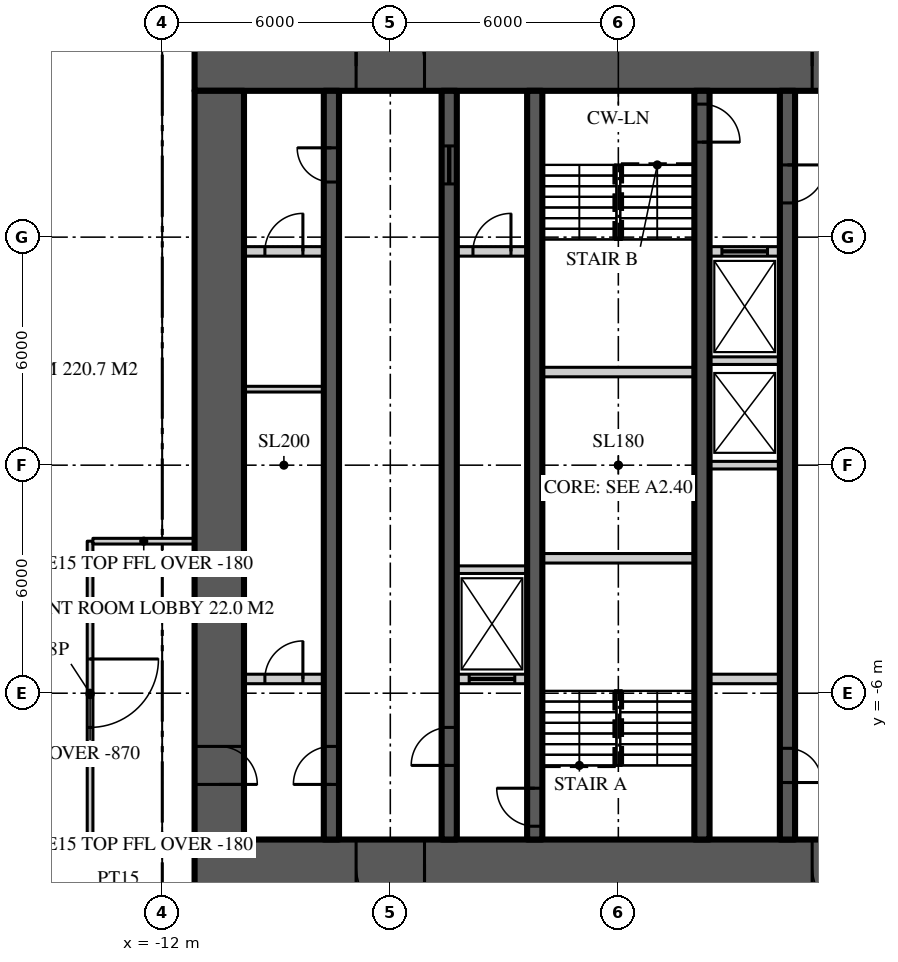
"""IFC4 building model, lengths in metres.
Left out: names, types, materials, properties, quantities, classifications, styles, units other than length and angle.
Written with IfcOpenShell. Run it as: python <this file> out.ifc"""

import sys

from ifc_helpers import new_model, si_unit, direction, frame, frame_2d, origin, place, context, subcontext, project, spatial, rectangle, extrude, element, fill, save


model = new_model("IFC4")
c1 = context("Model", 3, precision=1e-05, world=origin(), true_north=direction((0.0, 1.0)))
c2 = subcontext(c1, "Body", "Model", "MODEL_VIEW")
j1 = project(units=[si_unit("LENGTHUNIT", "METRE"), si_unit("PLANEANGLEUNIT", "RADIAN")], contexts=[c1])
p1 = place(None, origin())
s1 = spatial("IfcSite", under=j1, at=p1, CompositionType="ELEMENT")
p2 = place(p1, origin())
s2 = spatial("IfcBuilding", under=s1, at=p2, CompositionType="ELEMENT")
p3 = place(p2, frame((0.0, 0.0, 306.3)))
s3 = spatial("IfcBuildingStorey", under=s2, at=p3, CompositionType="ELEMENT", Elevation=306.3)
p4 = place(p3, frame((-11.15, 10.5, 0.0), z_axis=(0.0, 0.0, 1.0), x_axis=(1.0, 0.0, 0.0)))
e1 = element("IfcWall", 1, at=p4, inside=s3, PredefinedType="SHEAR", context=c2, shape_type="SweptSolid", body=[
    extrude(rectangle(XDim=22.3, YDim=1.3, at=frame_2d((11.15, 0.0))), origin(), (0.0, 0.0, 1.0), 5.0),
])
p5 = place(p4, frame((4.25, 0.0, 0.0)))
e2 = element("IfcOpeningElement", 2, at=p5, cuts=e1, PredefinedType="OPENING", context=c2, shape_type="SweptSolid", body=[
    extrude(rectangle(XDim=1.8, YDim=2.2, at=frame_2d((0.9, 1.1))), frame((0.0, 0.66, 0.0), z_axis=(0.0, -1.0, 0.0), x_axis=(1.0, 0.0, 0.0)), (0.0, 0.0, 1.0), 1.32),
])
p6 = place(p4, frame((16.25, 0.0, 0.0)))
e3 = element("IfcOpeningElement", 3, at=p6, cuts=e1, PredefinedType="OPENING", context=c2, shape_type="SweptSolid", body=[
    extrude(rectangle(XDim=1.8, YDim=2.2, at=frame_2d((0.9, 1.1))), frame((0.0, 0.66, 0.0), z_axis=(0.0, -1.0, 0.0), x_axis=(1.0, 0.0, 0.0)), (0.0, 0.0, 1.0), 1.32),
])
p7 = place(p3, frame((11.15, -10.5, 0.0), z_axis=(0.0, 0.0, 1.0), x_axis=(-1.0, 0.0, 0.0)))
e4 = element("IfcWall", 4, at=p7, inside=s3, PredefinedType="SHEAR", context=c2, shape_type="SweptSolid", body=[
    extrude(rectangle(XDim=22.3, YDim=1.3, at=frame_2d((11.15, 0.0))), origin(), (0.0, 0.0, 1.0), 5.0),
])
p8 = place(p7, frame((16.25, 0.0, 0.0)))
e5 = element("IfcOpeningElement", 5, at=p8, cuts=e4, PredefinedType="OPENING", context=c2, shape_type="SweptSolid", body=[
    extrude(rectangle(XDim=1.8, YDim=2.2, at=frame_2d((0.9, 1.1))), frame((0.0, 0.66, 0.0), z_axis=(0.0, -1.0, 0.0), x_axis=(1.0, 0.0, 0.0)), (0.0, 0.0, 1.0), 1.32),
])
p9 = place(p7, frame((4.25, 0.0, 0.0)))
e6 = element("IfcOpeningElement", 6, at=p9, cuts=e4, PredefinedType="OPENING", context=c2, shape_type="SweptSolid", body=[
    extrude(rectangle(XDim=1.8, YDim=2.2, at=frame_2d((0.9, 1.1))), frame((0.0, 0.66, 0.0), z_axis=(0.0, -1.0, 0.0), x_axis=(1.0, 0.0, 0.0)), (0.0, 0.0, 1.0), 1.32),
])
p10 = place(p3, frame((-10.5, 9.85, 0.0), z_axis=(0.0, 0.0, 1.0), x_axis=(0.0, -1.0, 0.0)))
e7 = element("IfcWall", 7, at=p10, inside=s3, PredefinedType="SHEAR", context=c2, shape_type="SweptSolid", body=[
    extrude(rectangle(XDim=19.7, YDim=1.3, at=frame_2d((9.85, 0.0))), origin(), (0.0, 0.0, 1.0), 5.0),
])
p11 = place(p10, frame((17.25, 0.0, 0.0)))
e8 = element("IfcOpeningElement", 8, at=p11, cuts=e7, PredefinedType="OPENING", context=c2, shape_type="SweptSolid", body=[
    extrude(rectangle(XDim=1.0, YDim=2.2, at=frame_2d((0.5, 1.1))), frame((0.0, 0.66, 0.0), z_axis=(0.0, -1.0, 0.0), x_axis=(1.0, 0.0, 0.0)), (0.0, 0.0, 1.0), 1.32),
])
p12 = place(p3, frame((-7.55, -9.85, 0.0), z_axis=(0.0, 0.0, 1.0), x_axis=(0.0, 1.0, 0.0)))
e9 = element("IfcWall", 9, at=p12, inside=s3, PredefinedType="SHEAR", context=c2, shape_type="SweptSolid", body=[
    extrude(rectangle(XDim=19.7, YDim=0.4, at=frame_2d((9.85, 0.0))), origin(), (0.0, 0.0, 1.0), 5.0),
])
p13 = place(p12, frame((1.45, 0.0, 0.0)))
e10 = element("IfcOpeningElement", 10, at=p13, cuts=e9, PredefinedType="OPENING", context=c2, shape_type="SweptSolid", body=[
    extrude(rectangle(XDim=1.0, YDim=2.2, at=frame_2d((0.5, 1.1))), frame((0.0, 0.21, 0.0), z_axis=(0.0, -1.0, 0.0), x_axis=(1.0, 0.0, 0.0)), (0.0, 0.0, 1.0), 0.42),
])
p14 = place(p12, frame((17.3, 0.0, 0.0)))
e11 = element("IfcOpeningElement", 11, at=p14, cuts=e9, PredefinedType="OPENING", context=c2, shape_type="SweptSolid", body=[
    extrude(rectangle(XDim=0.9, YDim=2.1, at=frame_2d((0.45, 1.05))), frame((0.0, 0.21, 0.0), z_axis=(0.0, -1.0, 0.0), x_axis=(1.0, 0.0, 0.0)), (0.0, 0.0, 1.0), 0.42),
])
p15 = place(p3, frame((-4.45, -9.85, 0.0), z_axis=(0.0, 0.0, 1.0), x_axis=(0.0, 1.0, 0.0)))
e12 = element("IfcWall", 12, at=p15, inside=s3, PredefinedType="SHEAR", context=c2, shape_type="SweptSolid", body=[
    extrude(rectangle(XDim=19.7, YDim=0.4, at=frame_2d((9.85, 0.0))), origin(), (0.0, 0.0, 1.0), 5.0),
])
p16 = place(p15, frame((1.95, 0.0, 0.0)))
e13 = element("IfcOpeningElement", 13, at=p16, cuts=e12, PredefinedType="OPENING", context=c2, shape_type="SweptSolid", body=[
    extrude(rectangle(XDim=1.0, YDim=2.2, at=frame_2d((0.5, 1.1))), frame((0.0, 0.21, 0.0), z_axis=(0.0, -1.0, 0.0), x_axis=(1.0, 0.0, 0.0)), (0.0, 0.0, 1.0), 0.42),
])
p17 = place(p15, frame((17.25, 0.0, 0.0)))
e14 = element("IfcOpeningElement", 14, at=p17, cuts=e12, PredefinedType="OPENING", context=c2, shape_type="SweptSolid", body=[
    extrude(rectangle(XDim=1.0, YDim=2.1, at=frame_2d((0.5, 1.05))), frame((0.0, 0.21, 0.0), z_axis=(0.0, -1.0, 0.0), x_axis=(1.0, 0.0, 0.0)), (0.0, 0.0, 1.0), 0.42),
])
p18 = place(p3, frame((4.45, 9.85, 0.0), z_axis=(0.0, 0.0, 1.0), x_axis=(0.0, -1.0, 0.0)))
e15 = element("IfcWall", 15, at=p18, inside=s3, PredefinedType="SHEAR", context=c2, shape_type="SweptSolid", body=[
    extrude(rectangle(XDim=19.7, YDim=0.4, at=frame_2d((9.85, 0.0))), origin(), (0.0, 0.0, 1.0), 5.0),
])
p19 = place(p18, frame((1.95, 0.0, 0.0)))
e16 = element("IfcOpeningElement", 16, at=p19, cuts=e15, PredefinedType="OPENING", context=c2, shape_type="SweptSolid", body=[
    extrude(rectangle(XDim=1.0, YDim=2.2, at=frame_2d((0.5, 1.1))), frame((0.0, 0.21, 0.0), z_axis=(0.0, -1.0, 0.0), x_axis=(1.0, 0.0, 0.0)), (0.0, 0.0, 1.0), 0.42),
])
p20 = place(p18, frame((17.3, 0.0, 0.0)))
e17 = element("IfcOpeningElement", 17, at=p20, cuts=e15, PredefinedType="OPENING", context=c2, shape_type="SweptSolid", body=[
    extrude(rectangle(XDim=0.9, YDim=2.1, at=frame_2d((0.45, 1.05))), frame((0.0, 0.21, 0.0), z_axis=(0.0, -1.0, 0.0), x_axis=(1.0, 0.0, 0.0)), (0.0, 0.0, 1.0), 0.42),
])
p21 = place(p3, frame((-2.2, -9.85, 0.0), z_axis=(0.0, 0.0, 1.0), x_axis=(0.0, 1.0, 0.0)))
e18 = element("IfcWall", 18, at=p21, inside=s3, PredefinedType="SHEAR", context=c2, shape_type="SweptSolid", body=[
    extrude(rectangle(XDim=19.7, YDim=0.4, at=frame_2d((9.85, 0.0))), origin(), (0.0, 0.0, 1.0), 5.0),
])
p22 = place(p21, frame((0.35, 0.0, 0.0)))
e19 = element("IfcOpeningElement", 19, at=p22, cuts=e18, PredefinedType="OPENING", context=c2, shape_type="SweptSolid", body=[
    extrude(rectangle(XDim=1.0, YDim=2.2, at=frame_2d((0.5, 1.1))), frame((0.0, 0.21, 0.0), z_axis=(0.0, -1.0, 0.0), x_axis=(1.0, 0.0, 0.0)), (0.0, 0.0, 1.0), 0.42),
])
p23 = place(p3, frame((2.2, 9.85, 0.0), z_axis=(0.0, 0.0, 1.0), x_axis=(0.0, -1.0, 0.0)))
e20 = element("IfcWall", 20, at=p23, inside=s3, PredefinedType="SHEAR", context=c2, shape_type="SweptSolid", body=[
    extrude(rectangle(XDim=19.7, YDim=0.4, at=frame_2d((9.85, 0.0))), origin(), (0.0, 0.0, 1.0), 5.0),
])
p24 = place(p23, frame((0.35, 0.0, 0.0)))
e21 = element("IfcOpeningElement", 21, at=p24, cuts=e20, PredefinedType="OPENING", context=c2, shape_type="SweptSolid", body=[
    extrude(rectangle(XDim=1.0, YDim=2.2, at=frame_2d((0.5, 1.1))), frame((0.0, 0.21, 0.0), z_axis=(0.0, -1.0, 0.0), x_axis=(1.0, 0.0, 0.0)), (0.0, 0.0, 1.0), 0.42),
])
p25 = place(p3, frame((-9.85, 5.625, 0.0), z_axis=(0.0, 0.0, 1.0), x_axis=(1.0, 0.0, 0.0)))
e22 = element("IfcWall", 22, at=p25, inside=s3, PredefinedType="SOLIDWALL", context=c2, shape_type="SweptSolid", body=[
    extrude(rectangle(XDim=2.1, YDim=0.25, at=frame_2d((1.05, 0.0))), origin(), (0.0, 0.0, 1.0), 4.8),
])
p26 = place(p25, frame((0.55, 0.0, 0.0)))
e23 = element("IfcOpeningElement", 23, at=p26, cuts=e22, PredefinedType="OPENING", context=c2, shape_type="SweptSolid", body=[
    extrude(rectangle(XDim=1.0, YDim=2.2, at=frame_2d((0.5, 1.1))), frame((0.0, 0.135, 0.0), z_axis=(0.0, -1.0, 0.0), x_axis=(1.0, 0.0, 0.0)), (0.0, 0.0, 1.0), 0.27),
])
p27 = place(p3, frame((-4.25, 5.625, 0.0), z_axis=(0.0, 0.0, 1.0), x_axis=(1.0, 0.0, 0.0)))
e24 = element("IfcWall", 24, at=p27, inside=s3, PredefinedType="SOLIDWALL", context=c2, shape_type="SweptSolid", body=[
    extrude(rectangle(XDim=1.85, YDim=0.25, at=frame_2d((0.925, 0.0))), origin(), (0.0, 0.0, 1.0), 4.8),
])
p28 = place(p27, frame((0.425, 0.0, 0.0)))
e25 = element("IfcOpeningElement", 25, at=p28, cuts=e24, PredefinedType="OPENING", context=c2, shape_type="SweptSolid", body=[
    extrude(rectangle(XDim=1.0, YDim=2.2, at=frame_2d((0.5, 1.1))), frame((0.0, 0.135, 0.0), z_axis=(0.0, -1.0, 0.0), x_axis=(1.0, 0.0, 0.0)), (0.0, 0.0, 1.0), 0.27),
])
p29 = place(p3, frame((2.4, 5.625, 0.0), z_axis=(0.0, 0.0, 1.0), x_axis=(1.0, 0.0, 0.0)))
e26 = element("IfcWall", 26, at=p29, inside=s3, PredefinedType="SOLIDWALL", context=c2, shape_type="SweptSolid", body=[
    extrude(rectangle(XDim=1.85, YDim=0.25, at=frame_2d((0.925, 0.0))), origin(), (0.0, 0.0, 1.0), 4.8),
])
p30 = place(p29, frame((0.325, 0.0, 0.0)))
e27 = element("IfcOpeningElement", 27, at=p30, cuts=e26, PredefinedType="OPENING", context=c2, shape_type="SweptSolid", body=[
    extrude(rectangle(XDim=1.2, YDim=2.2, at=frame_2d((0.6, 1.1))), frame((0.0, 0.135, 0.0), z_axis=(0.0, -1.0, 0.0), x_axis=(1.0, 0.0, 0.0)), (0.0, 0.0, 1.0), 0.27),
])
p31 = place(p3, frame((-9.85, -5.625, 0.0), z_axis=(0.0, 0.0, 1.0), x_axis=(1.0, 0.0, 0.0)))
e28 = element("IfcWall", 28, at=p31, inside=s3, PredefinedType="SOLIDWALL", context=c2, shape_type="SweptSolid", body=[
    extrude(rectangle(XDim=2.1, YDim=0.25, at=frame_2d((1.05, 0.0))), origin(), (0.0, 0.0, 1.0), 4.8),
])
p32 = place(p31, frame((0.55, 0.0, 0.0)))
e29 = element("IfcOpeningElement", 29, at=p32, cuts=e28, PredefinedType="OPENING", context=c2, shape_type="SweptSolid", body=[
    extrude(rectangle(XDim=1.0, YDim=2.2, at=frame_2d((0.5, 1.1))), frame((0.0, 0.135, 0.0), z_axis=(0.0, -1.0, 0.0), x_axis=(1.0, 0.0, 0.0)), (0.0, 0.0, 1.0), 0.27),
])
p33 = place(p3, frame((-4.25, -5.625, 0.0), z_axis=(0.0, 0.0, 1.0), x_axis=(1.0, 0.0, 0.0)))
e30 = element("IfcWall", 30, at=p33, inside=s3, PredefinedType="SOLIDWALL", context=c2, shape_type="SweptSolid", body=[
    extrude(rectangle(XDim=1.85, YDim=0.25, at=frame_2d((0.925, 0.0))), origin(), (0.0, 0.0, 1.0), 4.8),
])
p34 = place(p33, frame((0.325, 0.0, 0.0)))
e31 = element("IfcOpeningElement", 31, at=p34, cuts=e30, PredefinedType="OPENING", context=c2, shape_type="SweptSolid", body=[
    extrude(rectangle(XDim=1.2, YDim=2.2, at=frame_2d((0.6, 1.1))), frame((0.0, 0.135, 0.0), z_axis=(0.0, -1.0, 0.0), x_axis=(1.0, 0.0, 0.0)), (0.0, 0.0, 1.0), 0.27),
])
p35 = place(p3, frame((2.4, -5.625, 0.0), z_axis=(0.0, 0.0, 1.0), x_axis=(1.0, 0.0, 0.0)))
e32 = element("IfcWall", 32, at=p35, inside=s3, PredefinedType="SOLIDWALL", context=c2, shape_type="SweptSolid", body=[
    extrude(rectangle(XDim=1.85, YDim=0.25, at=frame_2d((0.925, 0.0))), origin(), (0.0, 0.0, 1.0), 4.8),
])
for number, where, z_axis, x_axis in (
    (33, (-2.0, -2.45, 0.0), (0.0, 0.0, 1.0), (1.0, 0.0, 0.0)),
    (34, (-2.0, 2.45, 0.0), (0.0, 0.0, 1.0), (1.0, 0.0, 0.0)),
):
    element("IfcWall", number, at=place(p3, frame(where, z_axis=z_axis, x_axis=x_axis)), inside=s3, PredefinedType="SOLIDWALL", context=c2, shape_type="SweptSolid", body=[
        extrude(rectangle(XDim=4.0, YDim=0.25, at=frame_2d((2.0, 0.0))), origin(), (0.0, 0.0, 1.0), 4.8),
    ])
for number, where, z_axis, x_axis in (
    (35, (-4.25, -2.75, 0.0), (0.0, 0.0, 1.0), (1.0, 0.0, 0.0)),
    (36, (2.4, 0.0, 0.0), (0.0, 0.0, 1.0), (1.0, 0.0, 0.0)),
    (37, (2.4, 2.75, 0.0), (0.0, 0.0, 1.0), (1.0, 0.0, 0.0)),
):
    element("IfcWall", number, at=place(p3, frame(where, z_axis=z_axis, x_axis=x_axis)), inside=s3, PredefinedType="SOLIDWALL", context=c2, shape_type="SweptSolid", body=[
        extrude(rectangle(XDim=1.85, YDim=0.2, at=frame_2d((0.925, 0.0))), origin(), (0.0, 0.0, 1.0), 4.8),
    ])
p36 = place(p3, frame((-13.9, -2.0, 0.0), z_axis=(0.0, 0.0, 1.0), x_axis=(0.0, -1.0, 0.0)))
e38 = element("IfcWall", 38, at=p36, inside=s3, PredefinedType="SOLIDWALL", context=c2, shape_type="SweptSolid", body=[
    extrude(rectangle(XDim=8.075, YDim=0.15, at=frame_2d((4.038, 0.0))), origin(), (0.0, 0.0, 1.0), 4.13),
])
p37 = place(p36, frame((3.1, 0.0, 0.0)))
e39 = element("IfcOpeningElement", 39, at=p37, cuts=e38, PredefinedType="OPENING", context=c2, shape_type="SweptSolid", body=[
    extrude(rectangle(XDim=1.8, YDim=2.4, at=frame_2d((0.9, 1.2))), frame((0.0, 0.085, 0.0), z_axis=(0.0, -1.0, 0.0), x_axis=(1.0, 0.0, 0.0)), (0.0, 0.0, 1.0), 0.17),
])
for number, where, z_axis, x_axis in (
    (40, (-11.15, -10.0, 0.0), (0.0, 0.0, 1.0), (-1.0, 0.0, 0.0)),
    (41, (-11.15, -2.0, 0.0), (0.0, 0.0, 1.0), (-1.0, 0.0, 0.0)),
):
    element("IfcWall", number, at=place(p3, frame(where, z_axis=z_axis, x_axis=x_axis)), inside=s3, PredefinedType="SOLIDWALL", context=c2, shape_type="SweptSolid", body=[
        extrude(rectangle(XDim=2.675, YDim=0.15, at=frame_2d((1.337, 0.0))), origin(), (0.0, 0.0, 1.0), 4.82),
    ])
p38 = place(p3, frame((-9.85, 2.0, 0.0), z_axis=(0.0, 0.0, 1.0), x_axis=(1.0, 0.0, 0.0)))
e42 = element("IfcWall", 42, at=p38, inside=s3, PredefinedType="SOLIDWALL", context=c2, shape_type="SweptSolid", body=[
    extrude(rectangle(XDim=2.1, YDim=0.15, at=frame_2d((1.05, 0.0))), origin(), (0.0, 0.0, 1.0), 4.82),
])
p39 = place(p5, origin())
e43 = element("IfcDoor", 43, at=p39, inside=s3, OperationType="DOUBLE_DOOR_DOUBLE_SWING", PredefinedType="DOOR", context=c2, shape_type="SweptSolid", body=[
    extrude(rectangle(XDim=1.8, YDim=2.2, at=frame_2d((0.9, 1.1))), frame((0.0, 0.025, 0.0), z_axis=(0.0, -1.0, 0.0), x_axis=(1.0, 0.0, 0.0)), (0.0, 0.0, 1.0), 0.05),
])
fill(e2, e43)
p40 = place(p8, origin())
e44 = element("IfcDoor", 44, at=p40, inside=s3, OperationType="DOUBLE_DOOR_DOUBLE_SWING", PredefinedType="DOOR", context=c2, shape_type="SweptSolid", body=[
    extrude(rectangle(XDim=1.8, YDim=2.2, at=frame_2d((0.9, 1.1))), frame((0.0, 0.025, 0.0), z_axis=(0.0, -1.0, 0.0), x_axis=(1.0, 0.0, 0.0)), (0.0, 0.0, 1.0), 0.05),
])
fill(e5, e44)
p41 = place(p6, origin())
e45 = element("IfcDoor", 45, at=p41, inside=s3, OperationType="DOUBLE_DOOR_DOUBLE_SWING", PredefinedType="DOOR", context=c2, shape_type="SweptSolid", body=[
    extrude(rectangle(XDim=1.8, YDim=2.2, at=frame_2d((0.9, 1.1))), frame((0.0, 0.025, 0.0), z_axis=(0.0, -1.0, 0.0), x_axis=(1.0, 0.0, 0.0)), (0.0, 0.0, 1.0), 0.05),
])
fill(e3, e45)
p42 = place(p9, origin())
e46 = element("IfcDoor", 46, at=p42, inside=s3, OperationType="DOUBLE_DOOR_DOUBLE_SWING", PredefinedType="DOOR", context=c2, shape_type="SweptSolid", body=[
    extrude(rectangle(XDim=1.8, YDim=2.2, at=frame_2d((0.9, 1.1))), frame((0.0, 0.025, 0.0), z_axis=(0.0, -1.0, 0.0), x_axis=(1.0, 0.0, 0.0)), (0.0, 0.0, 1.0), 0.05),
])
fill(e6, e46)
p43 = place(p13, origin())
e47 = element("IfcDoor", 47, at=p43, inside=s3, OperationType="SINGLE_SWING_LEFT", PredefinedType="DOOR", context=c2, shape_type="SweptSolid", body=[
    extrude(rectangle(XDim=1.0, YDim=2.2, at=frame_2d((0.5, 1.1))), frame((0.0, 0.025, 0.0), z_axis=(0.0, -1.0, 0.0), x_axis=(1.0, 0.0, 0.0)), (0.0, 0.0, 1.0), 0.05),
])
fill(e10, e47)
p44 = place(p11, origin())
e48 = element("IfcDoor", 48, at=p44, inside=s3, OperationType="SINGLE_SWING_RIGHT", PredefinedType="DOOR", context=c2, shape_type="SweptSolid", body=[
    extrude(rectangle(XDim=1.0, YDim=2.2, at=frame_2d((0.5, 1.1))), frame((0.0, 0.025, 0.0), z_axis=(0.0, -1.0, 0.0), x_axis=(1.0, 0.0, 0.0)), (0.0, 0.0, 1.0), 0.05),
])
fill(e8, e48)
p45 = place(p16, origin())
e49 = element("IfcDoor", 49, at=p45, inside=s3, OperationType="SINGLE_SWING_LEFT", PredefinedType="DOOR", context=c2, shape_type="SweptSolid", body=[
    extrude(rectangle(XDim=1.0, YDim=2.2, at=frame_2d((0.5, 1.1))), frame((0.0, 0.025, 0.0), z_axis=(0.0, -1.0, 0.0), x_axis=(1.0, 0.0, 0.0)), (0.0, 0.0, 1.0), 0.05),
])
fill(e13, e49)
p46 = place(p22, origin())
e50 = element("IfcDoor", 50, at=p46, inside=s3, OperationType="SINGLE_SWING_RIGHT", PredefinedType="DOOR", context=c2, shape_type="SweptSolid", body=[
    extrude(rectangle(XDim=1.0, YDim=2.2, at=frame_2d((0.5, 1.1))), frame((0.0, 0.025, 0.0), z_axis=(0.0, -1.0, 0.0), x_axis=(1.0, 0.0, 0.0)), (0.0, 0.0, 1.0), 0.05),
])
fill(e19, e50)
p47 = place(p19, origin())
e51 = element("IfcDoor", 51, at=p47, inside=s3, OperationType="SINGLE_SWING_LEFT", PredefinedType="DOOR", context=c2, shape_type="SweptSolid", body=[
    extrude(rectangle(XDim=1.0, YDim=2.2, at=frame_2d((0.5, 1.1))), frame((0.0, 0.025, 0.0), z_axis=(0.0, -1.0, 0.0), x_axis=(1.0, 0.0, 0.0)), (0.0, 0.0, 1.0), 0.05),
])
fill(e16, e51)
p48 = place(p24, origin())
e52 = element("IfcDoor", 52, at=p48, inside=s3, OperationType="SINGLE_SWING_RIGHT", PredefinedType="DOOR", context=c2, shape_type="SweptSolid", body=[
    extrude(rectangle(XDim=1.0, YDim=2.2, at=frame_2d((0.5, 1.1))), frame((0.0, 0.025, 0.0), z_axis=(0.0, -1.0, 0.0), x_axis=(1.0, 0.0, 0.0)), (0.0, 0.0, 1.0), 0.05),
])
fill(e21, e52)
p49 = place(p14, origin())
e53 = element("IfcDoor", 53, at=p49, inside=s3, OperationType="SINGLE_SWING_RIGHT", PredefinedType="DOOR", context=c2, shape_type="SweptSolid", body=[
    extrude(rectangle(XDim=0.9, YDim=2.1, at=frame_2d((0.45, 1.05))), frame((0.0, 0.025, 0.0), z_axis=(0.0, -1.0, 0.0), x_axis=(1.0, 0.0, 0.0)), (0.0, 0.0, 1.0), 0.05),
])
fill(e11, e53)
p50 = place(p17, origin())
e54 = element("IfcDoor", 54, at=p50, inside=s3, OperationType="SLIDING_TO_LEFT", PredefinedType="DOOR", context=c2, shape_type="SweptSolid", body=[
    extrude(rectangle(XDim=1.0, YDim=2.1, at=frame_2d((0.5, 1.05))), frame((0.0, 0.025, 0.0), z_axis=(0.0, -1.0, 0.0), x_axis=(1.0, 0.0, 0.0)), (0.0, 0.0, 1.0), 0.05),
])
fill(e14, e54)
p51 = place(p20, origin())
e55 = element("IfcDoor", 55, at=p51, inside=s3, OperationType="SINGLE_SWING_RIGHT", PredefinedType="DOOR", context=c2, shape_type="SweptSolid", body=[
    extrude(rectangle(XDim=0.9, YDim=2.1, at=frame_2d((0.45, 1.05))), frame((0.0, 0.025, 0.0), z_axis=(0.0, -1.0, 0.0), x_axis=(1.0, 0.0, 0.0)), (0.0, 0.0, 1.0), 0.05),
])
fill(e17, e55)
p52 = place(p34, origin())
e56 = element("IfcDoor", 56, at=p52, inside=s3, OperationType="SLIDING_TO_LEFT", PredefinedType="DOOR", context=c2, shape_type="SweptSolid", body=[
    extrude(rectangle(XDim=1.2, YDim=2.2, at=frame_2d((0.6, 1.1))), frame((0.0, 0.025, 0.0), z_axis=(0.0, -1.0, 0.0), x_axis=(1.0, 0.0, 0.0)), (0.0, 0.0, 1.0), 0.05),
])
fill(e31, e56)
p53 = place(p30, origin())
e57 = element("IfcDoor", 57, at=p53, inside=s3, OperationType="SLIDING_TO_LEFT", PredefinedType="DOOR", context=c2, shape_type="SweptSolid", body=[
    extrude(rectangle(XDim=1.2, YDim=2.2, at=frame_2d((0.6, 1.1))), frame((0.0, 0.025, 0.0), z_axis=(0.0, -1.0, 0.0), x_axis=(1.0, 0.0, 0.0)), (0.0, 0.0, 1.0), 0.05),
])
fill(e27, e57)
p54 = place(p37, origin())
e58 = element("IfcDoor", 58, at=p54, inside=s3, OperationType="DOUBLE_DOOR_DOUBLE_SWING", PredefinedType="DOOR", context=c2, shape_type="SweptSolid", body=[
    extrude(rectangle(XDim=1.8, YDim=2.4, at=frame_2d((0.9, 1.2))), frame((0.0, 0.025, 0.0), z_axis=(0.0, -1.0, 0.0), x_axis=(1.0, 0.0, 0.0)), (0.0, 0.0, 1.0), 0.05),
])
fill(e39, e58)
p55 = place(p26, origin())
e59 = element("IfcDoor", 59, at=p55, inside=s3, OperationType="SINGLE_SWING_RIGHT", PredefinedType="DOOR", context=c2, shape_type="SweptSolid", body=[
    extrude(rectangle(XDim=1.0, YDim=2.2, at=frame_2d((0.5, 1.1))), frame((0.0, 0.025, 0.0), z_axis=(0.0, -1.0, 0.0), x_axis=(1.0, 0.0, 0.0)), (0.0, 0.0, 1.0), 0.05),
])
fill(e23, e59)
p56 = place(p32, origin())
e60 = element("IfcDoor", 60, at=p56, inside=s3, OperationType="SINGLE_SWING_RIGHT", PredefinedType="DOOR", context=c2, shape_type="SweptSolid", body=[
    extrude(rectangle(XDim=1.0, YDim=2.2, at=frame_2d((0.5, 1.1))), frame((0.0, 0.025, 0.0), z_axis=(0.0, -1.0, 0.0), x_axis=(1.0, 0.0, 0.0)), (0.0, 0.0, 1.0), 0.05),
])
fill(e29, e60)
p57 = place(p28, origin())
e61 = element("IfcDoor", 61, at=p57, inside=s3, OperationType="SINGLE_SWING_RIGHT", PredefinedType="DOOR", context=c2, shape_type="SweptSolid", body=[
    extrude(rectangle(XDim=1.0, YDim=2.2, at=frame_2d((0.5, 1.1))), frame((0.0, 0.025, 0.0), z_axis=(0.0, -1.0, 0.0), x_axis=(1.0, 0.0, 0.0)), (0.0, 0.0, 1.0), 0.05),
])
fill(e25, e61)
save(model, sys.argv[1])
